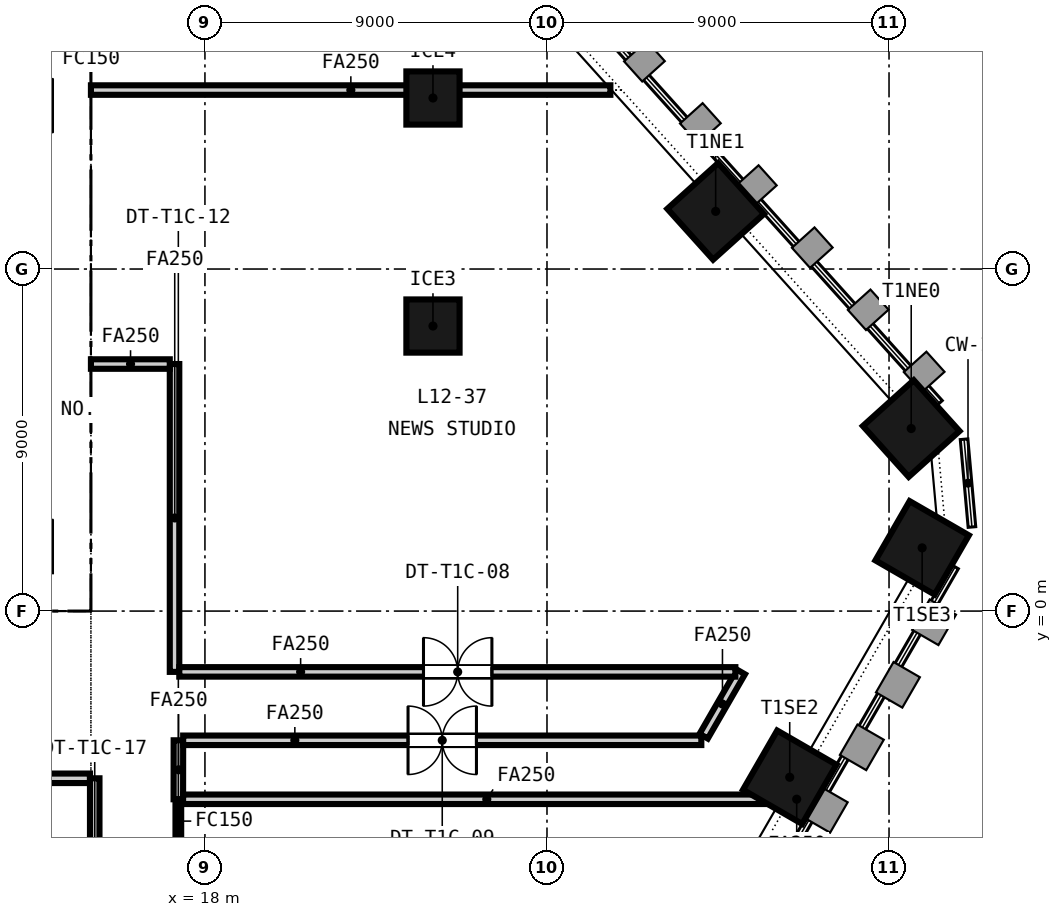
"""IFC4 building model, lengths in metres.
Left out: names, types, materials, properties, quantities, classifications, styles, units other than length and angle.
Written with IfcOpenShell. Run it as: python <this file> out.ifc"""

import sys

from ifc_helpers import new_model, si_unit, direction, frame, frame_2d, origin, origin_2d, place, context, subcontext, project, spatial, rectangle, extrude, element, fill, save


model = new_model("IFC4")
c1 = context("Model", 3, precision=1e-05, world=origin(), true_north=direction((0.0, 1.0)))
c2 = subcontext(c1, "Body", "Model", "MODEL_VIEW")
j1 = project(units=[si_unit("LENGTHUNIT", "METRE"), si_unit("PLANEANGLEUNIT", "RADIAN")], contexts=[c1])
p1 = place(None, origin())
s1 = spatial("IfcSite", under=j1, at=p1, CompositionType="ELEMENT")
p2 = place(p1, origin())
s2 = spatial("IfcBuilding", under=s1, at=p2, CompositionType="ELEMENT")
p3 = place(p2, frame((0.0, 0.0, 57.9)))
s3 = spatial("IfcBuildingStorey", under=s2, at=p3, CompositionType="ELEMENT", Elevation=57.9)
p4 = place(p3, frame((-15.0, 0.5, -0.15), z_axis=(0.0, 0.0, 1.0), x_axis=(1.0, 0.0, 0.0)))
e1 = element("IfcWall", 1, at=p4, inside=s3, PredefinedType="SOLIDWALL", context=c2, shape_type="SweptSolid", body=[
    extrude(rectangle(XDim=30.0, YDim=1.0, at=frame_2d((15.0, 0.0))), origin(), (0.0, 0.0, 1.0), 3.65),
])
p5 = place(p4, frame((5.8, 0.0, 0.15)))
e2 = element("IfcOpeningElement", 2, at=p5, cuts=e1, PredefinedType="OPENING", context=c2, shape_type="SweptSolid", body=[
    extrude(rectangle(XDim=2.4, YDim=2.4, at=frame_2d((1.2, 1.2))), frame((0.0, 0.51, 0.0), z_axis=(0.0, -1.0, 0.0), x_axis=(1.0, 0.0, 0.0)), (0.0, 0.0, 1.0), 1.02),
])
p6 = place(p4, frame((13.8, 0.0, 0.15)))
e3 = element("IfcOpeningElement", 3, at=p6, cuts=e1, PredefinedType="OPENING", context=c2, shape_type="SweptSolid", body=[
    extrude(rectangle(XDim=2.4, YDim=2.4, at=frame_2d((1.2, 1.2))), frame((0.0, 0.51, 0.0), z_axis=(0.0, -1.0, 0.0), x_axis=(1.0, 0.0, 0.0)), (0.0, 0.0, 1.0), 1.02),
])
p7 = place(p4, frame((21.8, 0.0, 0.15)))
e4 = element("IfcOpeningElement", 4, at=p7, cuts=e1, PredefinedType="OPENING", context=c2, shape_type="SweptSolid", body=[
    extrude(rectangle(XDim=2.4, YDim=2.4, at=frame_2d((1.2, 1.2))), frame((0.0, 0.51, 0.0), z_axis=(0.0, -1.0, 0.0), x_axis=(1.0, 0.0, 0.0)), (0.0, 0.0, 1.0), 1.02),
])
p8 = place(p4, frame((1.5, 0.0, 0.15)))
e5 = element("IfcOpeningElement", 5, at=p8, cuts=e1, PredefinedType="OPENING", context=c2, shape_type="SweptSolid", body=[
    extrude(rectangle(XDim=1.2, YDim=2.1, at=frame_2d((0.6, 1.05))), frame((0.0, 0.51, 0.0), z_axis=(0.0, -1.0, 0.0), x_axis=(1.0, 0.0, 0.0)), (0.0, 0.0, 1.0), 1.02),
])
p9 = place(p4, frame((27.3, 0.0, 0.15)))
e6 = element("IfcOpeningElement", 6, at=p9, cuts=e1, PredefinedType="OPENING", context=c2, shape_type="SweptSolid", body=[
    extrude(rectangle(XDim=1.2, YDim=2.1, at=frame_2d((0.6, 1.05))), frame((0.0, 0.51, 0.0), z_axis=(0.0, -1.0, 0.0), x_axis=(1.0, 0.0, 0.0)), (0.0, 0.0, 1.0), 1.02),
])
p10 = place(p3, frame((-15.0, 14.5, -0.15), z_axis=(0.0, 0.0, 1.0), x_axis=(1.0, 0.0, 0.0)))
e7 = element("IfcWall", 7, at=p10, inside=s3, PredefinedType="SOLIDWALL", context=c2, shape_type="SweptSolid", body=[
    extrude(rectangle(XDim=30.0, YDim=1.0, at=frame_2d((15.0, 0.0))), origin(), (0.0, 0.0, 1.0), 3.65),
])
p11 = place(p10, frame((9.25, 0.0, 0.15)))
e8 = element("IfcOpeningElement", 8, at=p11, cuts=e7, PredefinedType="OPENING", context=c2, shape_type="SweptSolid", body=[
    extrude(rectangle(XDim=1.5, YDim=2.1, at=frame_2d((0.75, 1.05))), frame((0.0, 0.51, 0.0), z_axis=(0.0, -1.0, 0.0), x_axis=(1.0, 0.0, 0.0)), (0.0, 0.0, 1.0), 1.02),
])
p12 = place(p10, frame((19.4, 0.0, 0.15)))
e9 = element("IfcOpeningElement", 9, at=p12, cuts=e7, PredefinedType="OPENING", context=c2, shape_type="SweptSolid", body=[
    extrude(rectangle(XDim=1.5, YDim=2.1, at=frame_2d((0.75, 1.05))), frame((0.0, 0.51, 0.0), z_axis=(0.0, -1.0, 0.0), x_axis=(1.0, 0.0, 0.0)), (0.0, 0.0, 1.0), 1.02),
])
p13 = place(p10, frame((1.5, 0.0, 0.15)))
e10 = element("IfcOpeningElement", 10, at=p13, cuts=e7, PredefinedType="OPENING", context=c2, shape_type="SweptSolid", body=[
    extrude(rectangle(XDim=1.2, YDim=2.1, at=frame_2d((0.6, 1.05))), frame((0.0, 0.51, 0.0), z_axis=(0.0, -1.0, 0.0), x_axis=(1.0, 0.0, 0.0)), (0.0, 0.0, 1.0), 1.02),
])
p14 = place(p10, frame((27.3, 0.0, 0.15)))
e11 = element("IfcOpeningElement", 11, at=p14, cuts=e7, PredefinedType="OPENING", context=c2, shape_type="SweptSolid", body=[
    extrude(rectangle(XDim=1.2, YDim=2.1, at=frame_2d((0.6, 1.05))), frame((0.0, 0.51, 0.0), z_axis=(0.0, -1.0, 0.0), x_axis=(1.0, 0.0, 0.0)), (0.0, 0.0, 1.0), 1.02),
])
p15 = place(p3, frame((14.5, 1.0, -0.15), z_axis=(0.0, 0.0, 1.0), x_axis=(0.0, 1.0, 0.0)))
e12 = element("IfcWall", 12, at=p15, inside=s3, PredefinedType="SOLIDWALL", context=c2, shape_type="SweptSolid", body=[
    extrude(rectangle(XDim=13.0, YDim=1.0, at=frame_2d((6.5, 0.0))), origin(), (0.0, 0.0, 1.0), 3.65),
])
for number, where, z_axis, x_axis in (
    (13, (33.387, -4.373, -0.15), (0.0, 0.0, 1.0), (0.5, 0.866, 0.0)),
    (14, (36.872, 1.663, -0.15), (0.0, 0.0, 1.0), (0.5, 0.866, 0.0)),
    (15, (36.584, 4.803, -0.15), (0.0, 0.0, 1.0), (-0.669, 0.743, 0.0)),
    (16, (31.438, 10.517, -0.15), (0.0, 0.0, 1.0), (-0.669, 0.743, 0.0)),
):
    element("IfcColumn", number, at=place(p3, frame(where, z_axis=z_axis, x_axis=x_axis)), inside=s3, PredefinedType="COLUMN", context=c2, shape_type="SweptSolid", body=[
        extrude(rectangle(XDim=1.8, YDim=1.8, at=origin_2d()), origin(), (0.0, 0.0, 1.0), 3.65),
    ])
for number, where, z_axis, x_axis in (
    (17, (24.0, 7.5, -0.15), (0.0, 0.0, 1.0), (1.0, 0.0, 0.0)),
    (18, (24.0, 13.5, -0.15), (0.0, 0.0, 1.0), (1.0, 0.0, 0.0)),
):
    element("IfcColumn", number, at=place(p3, frame(where, z_axis=z_axis, x_axis=x_axis)), inside=s3, PredefinedType="COLUMN", context=c2, shape_type="SweptSolid", body=[
        extrude(rectangle(XDim=1.4, YDim=1.4, at=origin_2d()), origin(), (0.0, 0.0, 1.0), 3.65),
    ])
p16 = place(p3, frame((11.05, 7.35, -0.15), z_axis=(0.0, 0.0, 1.0), x_axis=(1.0, 0.0, 0.0)))
e19 = element("IfcWall", 19, at=p16, inside=s3, PredefinedType="SOLIDWALL", context=c2, shape_type="SweptSolid", body=[
    extrude(rectangle(XDim=2.95, YDim=0.3, at=frame_2d((1.475, 0.0))), origin(), (0.0, 0.0, 1.0), 3.65),
])
p17 = place(p3, frame((14.975, -4.4, 0.0), z_axis=(0.0, 0.0, 1.0), x_axis=(-1.0, 0.0, 0.0)))
e20 = element("IfcWall", 20, at=p17, inside=s3, PredefinedType="PARTITIONING", context=c2, shape_type="SweptSolid", body=[
    extrude(rectangle(XDim=4.783, YDim=0.25, at=frame_2d((2.392, 0.0))), origin(), (0.0, 0.0, 1.0), 2.741),
])
p18 = place(p3, frame((17.2, 6.5, 0.0), z_axis=(0.0, 0.0, 1.0), x_axis=(0.0, -1.0, 0.0)))
e21 = element("IfcWall", 21, at=p18, inside=s3, PredefinedType="PARTITIONING", context=c2, shape_type="SweptSolid", body=[
    extrude(rectangle(XDim=8.1, YDim=0.25, at=frame_2d((4.05, 0.0))), origin(), (0.0, 0.0, 1.0), 2.741),
])
p19 = place(p3, frame((17.302, -3.4, 0.0), z_axis=(0.0, 0.0, 1.0), x_axis=(-0.00125845425, -0.999999208146, 0.0)))
e22 = element("IfcWall", 22, at=p19, inside=s3, PredefinedType="PARTITIONING", context=c2, shape_type="SweptSolid", body=[
    extrude(rectangle(XDim=1.552, YDim=0.25, at=frame_2d((0.776, 0.0))), origin(), (0.0, 0.0, 1.0), 2.741),
])
p20 = place(p3, frame((31.061, -3.4, 0.0), z_axis=(0.0, 0.0, 1.0), x_axis=(-1.0, 0.0, 0.0)))
e23 = element("IfcWall", 23, at=p20, inside=s3, PredefinedType="PARTITIONING", context=c2, shape_type="SweptSolid", body=[
    extrude(rectangle(XDim=13.634, YDim=0.25, at=frame_2d((6.817, 0.0))), origin(), (0.0, 0.0, 1.0), 2.741),
])
p21 = place(p20, frame((5.917, 0.0, 0.0)))
e24 = element("IfcOpeningElement", 24, at=p21, cuts=e23, PredefinedType="OPENING", context=c2, shape_type="SweptSolid", body=[
    extrude(rectangle(XDim=1.8, YDim=2.1, at=frame_2d((0.9, 1.05))), frame((0.0, 0.135, 0.0), z_axis=(0.0, -1.0, 0.0), x_axis=(1.0, 0.0, 0.0)), (0.0, 0.0, 1.0), 0.27),
])
p22 = place(p3, frame((32.101, -1.6, 0.0), z_axis=(0.0, 0.0, 1.0), x_axis=(-0.500331725305, -0.865833797362, 0.0)))
e25 = element("IfcWall", 25, at=p22, inside=s3, PredefinedType="PARTITIONING", context=c2, shape_type="SweptSolid", body=[
    extrude(rectangle(XDim=1.954, YDim=0.25, at=frame_2d((0.977, 0.0))), origin(), (0.0, 0.0, 1.0), 2.741),
])
p23 = place(p3, frame((17.3, -4.952, 0.0), z_axis=(0.0, 0.0, 1.0), x_axis=(0.0, -1.0, 0.0)))
e26 = element("IfcWall", 26, at=p23, inside=s3, PredefinedType="PARTITIONING", context=c2, shape_type="SweptSolid", body=[
    extrude(rectangle(XDim=3.398, YDim=0.15, at=frame_2d((1.699, 0.0))), origin(), (0.0, 0.0, 1.0), 2.741),
])
p24 = place(p23, frame((1.199, 0.0, 0.0)))
e27 = element("IfcOpeningElement", 27, at=p24, cuts=e26, PredefinedType="OPENING", context=c2, shape_type="SweptSolid", body=[
    extrude(rectangle(XDim=1.0, YDim=2.1, at=frame_2d((0.5, 1.05))), frame((0.0, 0.085, 0.0), z_axis=(0.0, -1.0, 0.0), x_axis=(1.0, 0.0, 0.0)), (0.0, 0.0, 1.0), 0.17),
])
p25 = place(p3, frame((15.0, 13.709, 0.0), z_axis=(0.0, 0.0, 1.0), x_axis=(1.0, 0.0, 0.0)))
e28 = element("IfcWall", 28, at=p25, inside=s3, PredefinedType="PARTITIONING", context=c2, shape_type="SweptSolid", body=[
    extrude(rectangle(XDim=13.668, YDim=0.25, at=frame_2d((6.834, 0.0))), origin(), (0.0, 0.0, 1.0), 2.741),
])
p26 = place(p3, frame((15.0, 6.5, 0.0), z_axis=(0.0, 0.0, 1.0), x_axis=(1.0, 0.0, 0.0)))
e29 = element("IfcWall", 29, at=p26, inside=s3, PredefinedType="PARTITIONING", context=c2, shape_type="SweptSolid", body=[
    extrude(rectangle(XDim=2.075, YDim=0.25, at=frame_2d((1.038, 0.0))), origin(), (0.0, 0.0, 1.0), 2.741),
])
p27 = place(p3, frame((17.325, -1.6, 0.0), z_axis=(0.0, 0.0, 1.0), x_axis=(1.0, 0.0, 0.0)))
e30 = element("IfcWall", 30, at=p27, inside=s3, PredefinedType="PARTITIONING", context=c2, shape_type="SweptSolid", body=[
    extrude(rectangle(XDim=14.632, YDim=0.25, at=frame_2d((7.316, 0.0))), origin(), (0.0, 0.0, 1.0), 2.741),
])
p28 = place(p27, frame((6.426, 0.0, 0.0)))
e31 = element("IfcOpeningElement", 31, at=p28, cuts=e30, PredefinedType="OPENING", context=c2, shape_type="SweptSolid", body=[
    extrude(rectangle(XDim=1.8, YDim=2.1, at=frame_2d((0.9, 1.05))), frame((0.0, 0.135, 0.0), z_axis=(0.0, -1.0, 0.0), x_axis=(1.0, 0.0, 0.0)), (0.0, 0.0, 1.0), 0.27),
])
p29 = place(p3, frame((33.398, -4.952, 0.0), z_axis=(0.0, 0.0, 1.0), x_axis=(-1.0, 0.0, 0.0)))
e32 = element("IfcWall", 32, at=p29, inside=s3, PredefinedType="PARTITIONING", context=c2, shape_type="SweptSolid", body=[
    extrude(rectangle(XDim=15.973, YDim=0.25, at=frame_2d((7.986, 0.0))), origin(), (0.0, 0.0, 1.0), 2.741),
])
p30 = place(p3, frame((33.398, -4.95, 0.0), z_axis=(0.0, 0.0, 1.0), x_axis=(1.0, 0.0, 0.0)))
e33 = element("IfcWall", 33, at=p30, inside=s3, PredefinedType="PARTITIONING", context=c2, shape_type="SweptSolid", body=[
    extrude(rectangle(XDim=0.335, YDim=0.25, at=frame_2d((0.167, 0.0))), origin(), (0.0, 0.0, 1.0), 2.741),
])
p31 = place(p3, frame((15.1, -20.275, 0.0), z_axis=(0.0, 0.0, 1.0), x_axis=(0.0, 1.0, 0.0)))
e34 = element("IfcWall", 34, at=p31, inside=s3, PredefinedType="PARTITIONING", context=c2, shape_type="SweptSolid", body=[
    extrude(rectangle(XDim=15.875, YDim=0.25, at=frame_2d((7.938, 0.0))), origin(), (0.0, 0.0, 1.0), 2.741),
])
p32 = place(p31, frame((8.942, 0.0, 0.0)))
e35 = element("IfcOpeningElement", 35, at=p32, cuts=e34, PredefinedType="OPENING", context=c2, shape_type="SweptSolid", body=[
    extrude(rectangle(XDim=1.8, YDim=2.1, at=frame_2d((0.9, 1.05))), frame((0.0, 0.135, 0.0), z_axis=(0.0, -1.0, 0.0), x_axis=(1.0, 0.0, 0.0)), (0.0, 0.0, 1.0), 0.27),
])
p33 = place(p28, origin())
e36 = element("IfcDoor", 36, at=p33, inside=s3, OperationType="DOUBLE_DOOR_DOUBLE_SWING", PredefinedType="DOOR", context=c2, shape_type="SweptSolid", body=[
    extrude(rectangle(XDim=1.8, YDim=2.1, at=frame_2d((0.9, 1.05))), frame((0.0, 0.025, 0.0), z_axis=(0.0, -1.0, 0.0), x_axis=(1.0, 0.0, 0.0)), (0.0, 0.0, 1.0), 0.05),
])
fill(e31, e36)
p34 = place(p21, origin())
e37 = element("IfcDoor", 37, at=p34, inside=s3, OperationType="DOUBLE_DOOR_DOUBLE_SWING", PredefinedType="DOOR", context=c2, shape_type="SweptSolid", body=[
    extrude(rectangle(XDim=1.8, YDim=2.1, at=frame_2d((0.9, 1.05))), frame((0.0, 0.025, 0.0), z_axis=(0.0, -1.0, 0.0), x_axis=(1.0, 0.0, 0.0)), (0.0, 0.0, 1.0), 0.05),
])
fill(e24, e37)
save(model, sys.argv[1])
